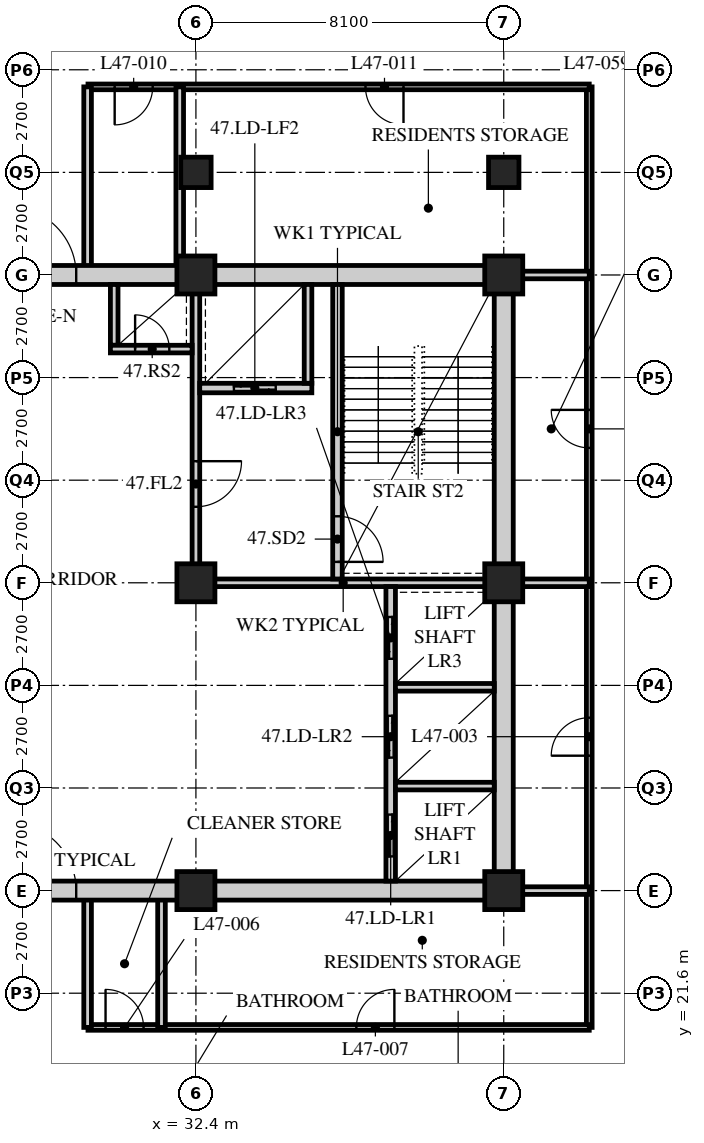
"""IFC4 building model, lengths in metres.
Left out: names, types, materials, properties, quantities, classifications, styles, units other than length and angle.
Written with IfcOpenShell. Run it as: python <this file> out.ifc"""

import sys

from ifc_helpers import new_model, si_unit, direction, frame, frame_2d, origin, origin_2d, place, context, subcontext, project, spatial, rectangle, hollow_rectangle, extrude, element, fill, save


model = new_model("IFC4")
c1 = context("Model", 3, precision=1e-05, world=origin(), true_north=direction((0.0, 1.0)))
c2 = subcontext(c1, "Body", "Model", "MODEL_VIEW")
j1 = project(units=[si_unit("LENGTHUNIT", "METRE"), si_unit("PLANEANGLEUNIT", "RADIAN")], contexts=[c1])
p1 = place(None, origin())
s1 = spatial("IfcSite", under=j1, at=p1, CompositionType="ELEMENT")
p2 = place(p1, origin())
s2 = spatial("IfcBuilding", under=s1, at=p2, CompositionType="ELEMENT")
p3 = place(p2, frame((0.0, 0.0, 184.8)))
s3 = spatial("IfcBuildingStorey", under=s2, at=p3, CompositionType="ELEMENT", Elevation=184.8)
for number, where, z_axis, x_axis in (
    (1, (32.4, 24.3, 0.0), (0.0, 0.0, 1.0), (1.0, 0.0, 0.0)),
    (2, (32.4, 32.4, 0.0), (0.0, 0.0, 1.0), (1.0, 0.0, 0.0)),
    (3, (32.4, 40.5, 0.0), (0.0, 0.0, 1.0), (1.0, 0.0, 0.0)),
):
    element("IfcColumn", number, at=place(p3, frame(where, z_axis=z_axis, x_axis=x_axis)), inside=s3, PredefinedType="COLUMN", context=c2, shape_type="SweptSolid", body=[
        extrude(hollow_rectangle(XDim=1.0, YDim=1.0, WallThickness=0.1, at=origin_2d()), origin(), (0.0, 0.0, 1.0), 3.6),
    ])
p4 = place(p3, frame((32.4, 43.2, 0.0), z_axis=(0.0, 0.0, 1.0), x_axis=(1.0, 0.0, 0.0)))
e4 = element("IfcColumn", 4, at=p4, inside=s3, PredefinedType="COLUMN", context=c2, shape_type="SweptSolid", body=[
    extrude(hollow_rectangle(XDim=0.8, YDim=0.8, WallThickness=0.08, at=origin_2d()), origin(), (0.0, 0.0, 1.0), 3.6),
])
for number, where, z_axis, x_axis in (
    (5, (40.5, 24.3, 0.0), (0.0, 0.0, 1.0), (1.0, 0.0, 0.0)),
    (6, (40.5, 32.4, 0.0), (0.0, 0.0, 1.0), (1.0, 0.0, 0.0)),
    (7, (40.5, 40.5, 0.0), (0.0, 0.0, 1.0), (1.0, 0.0, 0.0)),
):
    element("IfcColumn", number, at=place(p3, frame(where, z_axis=z_axis, x_axis=x_axis)), inside=s3, PredefinedType="COLUMN", context=c2, shape_type="SweptSolid", body=[
        extrude(hollow_rectangle(XDim=1.0, YDim=1.0, WallThickness=0.1, at=origin_2d()), origin(), (0.0, 0.0, 1.0), 3.6),
    ])
p5 = place(p3, frame((40.5, 43.2, 0.0), z_axis=(0.0, 0.0, 1.0), x_axis=(1.0, 0.0, 0.0)))
e8 = element("IfcColumn", 8, at=p5, inside=s3, PredefinedType="COLUMN", context=c2, shape_type="SweptSolid", body=[
    extrude(hollow_rectangle(XDim=0.8, YDim=0.8, WallThickness=0.08, at=origin_2d()), origin(), (0.0, 0.0, 1.0), 3.6),
])
p6 = place(p3, frame((42.75, 20.7, 0.0), z_axis=(0.0, 0.0, 1.0), x_axis=(0.0, 1.0, 0.0)))
e9 = element("IfcWall", 9, at=p6, inside=s3, PredefinedType="PARTITIONING", context=c2, shape_type="SweptSolid", body=[
    extrude(rectangle(XDim=24.75, YDim=0.15, at=frame_2d((12.375, 0.0))), origin(), (0.0, 0.0, 1.0), 3.39),
])
p7 = place(p6, frame((7.15, 0.0, 0.0)))
e10 = element("IfcOpeningElement", 10, at=p7, cuts=e9, PredefinedType="OPENING", context=c2, shape_type="SweptSolid", body=[
    extrude(rectangle(XDim=1.0, YDim=2.1, at=frame_2d((0.5, 1.05))), frame((0.0, 0.085, 0.0), z_axis=(0.0, -1.0, 0.0), x_axis=(1.0, 0.0, 0.0)), (0.0, 0.0, 1.0), 0.17),
])
p8 = place(p6, frame((15.25, 0.0, 0.0)))
e11 = element("IfcOpeningElement", 11, at=p8, cuts=e9, PredefinedType="OPENING", context=c2, shape_type="SweptSolid", body=[
    extrude(rectangle(XDim=1.0, YDim=2.1, at=frame_2d((0.5, 1.05))), frame((0.0, 0.085, 0.0), z_axis=(0.0, -1.0, 0.0), x_axis=(1.0, 0.0, 0.0)), (0.0, 0.0, 1.0), 0.17),
])
p9 = place(p3, frame((42.75, 45.45, 0.0), z_axis=(0.0, 0.0, 1.0), x_axis=(-1.0, 0.0, 0.0)))
e12 = element("IfcWall", 12, at=p9, inside=s3, PredefinedType="PARTITIONING", context=c2, shape_type="SweptSolid", body=[
    extrude(rectangle(XDim=13.19, YDim=0.15, at=frame_2d((6.595, 0.0))), origin(), (0.0, 0.0, 1.0), 3.39),
])
p10 = place(p9, frame((11.488, 0.0, 0.0)))
e13 = element("IfcOpeningElement", 13, at=p10, cuts=e12, PredefinedType="OPENING", context=c2, shape_type="SweptSolid", body=[
    extrude(rectangle(XDim=1.0, YDim=2.1, at=frame_2d((0.5, 1.05))), frame((0.0, 0.085, 0.0), z_axis=(0.0, -1.0, 0.0), x_axis=(1.0, 0.0, 0.0)), (0.0, 0.0, 1.0), 0.17),
])
p11 = place(p9, frame((4.888, 0.0, 0.0)))
e14 = element("IfcOpeningElement", 14, at=p11, cuts=e12, PredefinedType="OPENING", context=c2, shape_type="SweptSolid", body=[
    extrude(rectangle(XDim=1.0, YDim=2.1, at=frame_2d((0.5, 1.05))), frame((0.0, 0.085, 0.0), z_axis=(0.0, -1.0, 0.0), x_axis=(1.0, 0.0, 0.0)), (0.0, 0.0, 1.0), 0.17),
])
p12 = place(p3, frame((29.56, 20.7, 0.0), z_axis=(0.0, 0.0, 1.0), x_axis=(1.0, 0.0, 0.0)))
e15 = element("IfcWall", 15, at=p12, inside=s3, PredefinedType="PARTITIONING", context=c2, shape_type="SweptSolid", body=[
    extrude(rectangle(XDim=13.19, YDim=0.15, at=frame_2d((6.595, 0.0))), origin(), (0.0, 0.0, 1.0), 3.39),
])
p13 = place(p12, frame((0.462, 0.0, 0.0)))
e16 = element("IfcOpeningElement", 16, at=p13, cuts=e15, PredefinedType="OPENING", context=c2, shape_type="SweptSolid", body=[
    extrude(rectangle(XDim=1.0, YDim=2.1, at=frame_2d((0.5, 1.05))), frame((0.0, 0.085, 0.0), z_axis=(0.0, -1.0, 0.0), x_axis=(1.0, 0.0, 0.0)), (0.0, 0.0, 1.0), 0.17),
])
p14 = place(p12, frame((7.062, 0.0, 0.0)))
e17 = element("IfcOpeningElement", 17, at=p14, cuts=e15, PredefinedType="OPENING", context=c2, shape_type="SweptSolid", body=[
    extrude(rectangle(XDim=1.0, YDim=2.1, at=frame_2d((0.5, 1.05))), frame((0.0, 0.085, 0.0), z_axis=(0.0, -1.0, 0.0), x_axis=(1.0, 0.0, 0.0)), (0.0, 0.0, 1.0), 0.17),
])
p15 = place(p3, frame((40.5, 32.4, 0.0), z_axis=(0.0, 0.0, 1.0), x_axis=(1.0, 0.0, 0.0)))
e18 = element("IfcWall", 18, at=p15, inside=s3, PredefinedType="SOLIDWALL", context=c2, shape_type="SweptSolid", body=[
    extrude(rectangle(XDim=2.25, YDim=0.2, at=frame_2d((1.125, 0.0))), origin(), (0.0, 0.0, 1.0), 3.39),
])
for number, where, z_axis, x_axis in (
    (19, (31.494, 20.7, 0.0), (0.0, 0.0, 1.0), (0.0, 1.0, 0.0)),
    (20, (29.55, 20.7, 0.0), (0.0, 0.0, 1.0), (0.0, 1.0, 0.0)),
):
    element("IfcWall", number, at=place(p3, frame(where, z_axis=z_axis, x_axis=x_axis)), inside=s3, PredefinedType="SOLIDWALL", context=c2, shape_type="SweptSolid", body=[
        extrude(rectangle(XDim=3.6, YDim=0.2, at=frame_2d((1.8, 0.0))), origin(), (0.0, 0.0, 1.0), 3.39),
    ])
p16 = place(p3, frame((31.974, 45.45, 0.0), z_axis=(0.0, 0.0, 1.0), x_axis=(0.0, -1.0, 0.0)))
e21 = element("IfcWall", 21, at=p16, inside=s3, PredefinedType="SOLIDWALL", context=c2, shape_type="SweptSolid", body=[
    extrude(rectangle(XDim=4.95, YDim=0.2, at=frame_2d((2.475, 0.0))), origin(), (0.0, 0.0, 1.0), 2.69),
])
p17 = place(p3, frame((29.55, 40.5, 0.0), z_axis=(0.0, 0.0, 1.0), x_axis=(0.0, 1.0, 0.0)))
e22 = element("IfcWall", 22, at=p17, inside=s3, PredefinedType="SOLIDWALL", context=c2, shape_type="SweptSolid", body=[
    extrude(rectangle(XDim=4.95, YDim=0.2, at=frame_2d((2.475, 0.0))), origin(), (0.0, 0.0, 1.0), 3.39),
])
for number, where, z_axis, x_axis in (
    (23, (40.5, 24.3, 0.0), (0.0, 0.0, 1.0), (1.0, 0.0, 0.0)),
    (24, (40.5, 40.5, 0.0), (0.0, 0.0, 1.0), (1.0, 0.0, 0.0)),
):
    element("IfcWall", number, at=place(p3, frame(where, z_axis=z_axis, x_axis=x_axis)), inside=s3, PredefinedType="SOLIDWALL", context=c2, shape_type="SweptSolid", body=[
        extrude(rectangle(XDim=2.25, YDim=0.2, at=frame_2d((1.125, 0.0))), origin(), (0.0, 0.0, 1.0), 3.39),
    ])
p18 = place(p3, frame((15.95, 24.3, 0.0), z_axis=(0.0, 0.0, 1.0), x_axis=(1.0, 0.0, 0.0)))
e25 = element("IfcWall", 25, at=p18, inside=s3, PredefinedType="SOLIDWALL", context=c2, shape_type="SweptSolid", body=[
    extrude(rectangle(XDim=24.8, YDim=0.5, at=frame_2d((12.4, 0.0))), origin(), (0.0, 0.0, 1.0), 2.74),
])
p19 = place(p18, frame((11.5, 0.0, 0.0)))
e26 = element("IfcOpeningElement", 26, at=p19, cuts=e25, PredefinedType="OPENING", context=c2, shape_type="SweptSolid", body=[
    extrude(rectangle(XDim=1.8, YDim=2.4, at=frame_2d((0.9, 1.2))), frame((0.0, 0.26, 0.0), z_axis=(0.0, -1.0, 0.0), x_axis=(1.0, 0.0, 0.0)), (0.0, 0.0, 1.0), 0.52),
])
p20 = place(p3, frame((15.95, 40.5, 0.0), z_axis=(0.0, 0.0, 1.0), x_axis=(1.0, 0.0, 0.0)))
e27 = element("IfcWall", 27, at=p20, inside=s3, PredefinedType="SOLIDWALL", context=c2, shape_type="SweptSolid", body=[
    extrude(rectangle(XDim=24.8, YDim=0.5, at=frame_2d((12.4, 0.0))), origin(), (0.0, 0.0, 1.0), 2.74),
])
p21 = place(p20, frame((11.5, 0.0, 0.0)))
e28 = element("IfcOpeningElement", 28, at=p21, cuts=e27, PredefinedType="OPENING", context=c2, shape_type="SweptSolid", body=[
    extrude(rectangle(XDim=1.8, YDim=2.4, at=frame_2d((0.9, 1.2))), frame((0.0, 0.26, 0.0), z_axis=(0.0, -1.0, 0.0), x_axis=(1.0, 0.0, 0.0)), (0.0, 0.0, 1.0), 0.52),
])
p22 = place(p3, frame((40.5, 24.55, 0.0), z_axis=(0.0, 0.0, 1.0), x_axis=(0.0, 1.0, 0.0)))
e29 = element("IfcWall", 29, at=p22, inside=s3, PredefinedType="SOLIDWALL", context=c2, shape_type="SweptSolid", body=[
    extrude(rectangle(XDim=15.7, YDim=0.5, at=frame_2d((7.85, 0.0))), origin(), (0.0, 0.0, 1.0), 2.778),
])
p23 = place(p3, frame((32.3, 32.4, 0.0), z_axis=(0.0, 0.0, 1.0), x_axis=(1.0, 0.0, 0.0)))
e30 = element("IfcWall", 30, at=p23, inside=s3, PredefinedType="SOLIDWALL", context=c2, shape_type="SweptSolid", body=[
    extrude(rectangle(XDim=7.95, YDim=0.2, at=frame_2d((3.975, 0.0))), origin(), (0.0, 0.0, 1.0), 2.778),
])
p24 = place(p3, frame((32.4, 32.5, 0.0), z_axis=(0.0, 0.0, 1.0), x_axis=(0.0, 1.0, 0.0)))
e31 = element("IfcWall", 31, at=p24, inside=s3, PredefinedType="SOLIDWALL", context=c2, shape_type="SweptSolid", body=[
    extrude(rectangle(XDim=7.75, YDim=0.2, at=frame_2d((3.875, 0.0))), origin(), (0.0, 0.0, 1.0), 2.778),
])
p25 = place(p24, frame((1.9, 0.0, 0.0)))
e32 = element("IfcOpeningElement", 32, at=p25, cuts=e31, PredefinedType="OPENING", context=c2, shape_type="SweptSolid", body=[
    extrude(rectangle(XDim=1.2, YDim=2.1, at=frame_2d((0.6, 1.05))), frame((0.0, 0.11, 0.0), z_axis=(0.0, -1.0, 0.0), x_axis=(1.0, 0.0, 0.0)), (0.0, 0.0, 1.0), 0.22),
])
p26 = place(p3, frame((37.525, 24.55, 0.0), z_axis=(0.0, 0.0, 1.0), x_axis=(0.0, 1.0, 0.0)))
e33 = element("IfcWall", 33, at=p26, inside=s3, PredefinedType="SOLIDWALL", context=c2, shape_type="SweptSolid", body=[
    extrude(rectangle(XDim=7.75, YDim=0.25, at=frame_2d((3.875, 0.0))), origin(), (0.0, 0.0, 1.0), 3.39),
])
p27 = place(p26, frame((0.65, 0.0, 0.0)))
e34 = element("IfcOpeningElement", 34, at=p27, cuts=e33, PredefinedType="OPENING", context=c2, shape_type="SweptSolid", body=[
    extrude(rectangle(XDim=1.1, YDim=2.4, at=frame_2d((0.55, 1.2))), frame((0.0, 0.135, 0.0), z_axis=(0.0, -1.0, 0.0), x_axis=(1.0, 0.0, 0.0)), (0.0, 0.0, 1.0), 0.27),
])
p28 = place(p26, frame((3.25, 0.0, 0.0)))
e35 = element("IfcOpeningElement", 35, at=p28, cuts=e33, PredefinedType="OPENING", context=c2, shape_type="SweptSolid", body=[
    extrude(rectangle(XDim=1.1, YDim=2.4, at=frame_2d((0.55, 1.2))), frame((0.0, 0.135, 0.0), z_axis=(0.0, -1.0, 0.0), x_axis=(1.0, 0.0, 0.0)), (0.0, 0.0, 1.0), 0.27),
])
p29 = place(p26, frame((5.85, 0.0, 0.0)))
e36 = element("IfcOpeningElement", 36, at=p29, cuts=e33, PredefinedType="OPENING", context=c2, shape_type="SweptSolid", body=[
    extrude(rectangle(XDim=1.1, YDim=2.4, at=frame_2d((0.55, 1.2))), frame((0.0, 0.135, 0.0), z_axis=(0.0, -1.0, 0.0), x_axis=(1.0, 0.0, 0.0)), (0.0, 0.0, 1.0), 0.27),
])
for number, where, z_axis, x_axis in (
    (37, (37.65, 27.05, 0.0), (0.0, 0.0, 1.0), (1.0, 0.0, 0.0)),
    (38, (37.65, 29.65, 0.0), (0.0, 0.0, 1.0), (1.0, 0.0, 0.0)),
):
    element("IfcWall", number, at=place(p3, frame(where, z_axis=z_axis, x_axis=x_axis)), inside=s3, PredefinedType="SOLIDWALL", context=c2, shape_type="SweptSolid", body=[
        extrude(rectangle(XDim=2.6, YDim=0.2, at=frame_2d((1.3, 0.0))), origin(), (0.0, 0.0, 1.0), 3.39),
    ])
p30 = place(p3, frame((36.125, 32.5, 0.0), z_axis=(0.0, 0.0, 1.0), x_axis=(0.0, 1.0, 0.0)))
e39 = element("IfcWall", 39, at=p30, inside=s3, PredefinedType="SOLIDWALL", context=c2, shape_type="SweptSolid", body=[
    extrude(rectangle(XDim=7.75, YDim=0.25, at=frame_2d((3.875, 0.0))), origin(), (0.0, 0.0, 1.0), 3.39),
])
p31 = place(p30, frame((0.45, 0.0, 0.0)))
e40 = element("IfcOpeningElement", 40, at=p31, cuts=e39, PredefinedType="OPENING", context=c2, shape_type="SweptSolid", body=[
    extrude(rectangle(XDim=1.2, YDim=2.1, at=frame_2d((0.6, 1.05))), frame((0.0, 0.135, 0.0), z_axis=(0.0, -1.0, 0.0), x_axis=(1.0, 0.0, 0.0)), (0.0, 0.0, 1.0), 0.27),
])
p32 = place(p3, frame((32.5, 37.525, 0.0), z_axis=(0.0, 0.0, 1.0), x_axis=(1.0, 0.0, 0.0)))
e41 = element("IfcWall", 41, at=p32, inside=s3, PredefinedType="SOLIDWALL", context=c2, shape_type="SweptSolid", body=[
    extrude(rectangle(XDim=2.95, YDim=0.25, at=frame_2d((1.475, 0.0))), origin(), (0.0, 0.0, 1.0), 3.39),
])
p33 = place(p32, frame((0.9, 0.0, 0.0)))
e42 = element("IfcOpeningElement", 42, at=p33, cuts=e41, PredefinedType="OPENING", context=c2, shape_type="SweptSolid", body=[
    extrude(rectangle(XDim=1.1, YDim=2.4, at=frame_2d((0.55, 1.2))), frame((0.0, 0.135, 0.0), z_axis=(0.0, -1.0, 0.0), x_axis=(1.0, 0.0, 0.0)), (0.0, 0.0, 1.0), 0.27),
])
p34 = place(p3, frame((35.35, 37.65, 0.0), z_axis=(0.0, 0.0, 1.0), x_axis=(0.0, 1.0, 0.0)))
e43 = element("IfcWall", 43, at=p34, inside=s3, PredefinedType="SOLIDWALL", context=c2, shape_type="SweptSolid", body=[
    extrude(rectangle(XDim=2.6, YDim=0.2, at=frame_2d((1.3, 0.0))), origin(), (0.0, 0.0, 1.0), 3.39),
])
p35 = place(p3, frame((30.25, 38.65, 0.0), z_axis=(0.0, 0.0, 1.0), x_axis=(0.0, 1.0, 0.0)))
e44 = element("IfcWall", 44, at=p35, inside=s3, PredefinedType="SOLIDWALL", context=c2, shape_type="SweptSolid", body=[
    extrude(rectangle(XDim=1.6, YDim=0.2, at=frame_2d((0.8, 0.0))), origin(), (0.0, 0.0, 1.0), 3.39),
])
p36 = place(p3, frame((30.15, 38.55, 0.0), z_axis=(0.0, 0.0, 1.0), x_axis=(1.0, 0.0, 0.0)))
e45 = element("IfcWall", 45, at=p36, inside=s3, PredefinedType="SOLIDWALL", context=c2, shape_type="SweptSolid", body=[
    extrude(rectangle(XDim=2.15, YDim=0.2, at=frame_2d((1.075, 0.0))), origin(), (0.0, 0.0, 1.0), 3.39),
])
p37 = place(p36, frame((0.65, 0.0, 0.0)))
e46 = element("IfcOpeningElement", 46, at=p37, cuts=e45, PredefinedType="OPENING", context=c2, shape_type="SweptSolid", body=[
    extrude(rectangle(XDim=0.9, YDim=2.1, at=frame_2d((0.45, 1.05))), frame((0.0, 0.11, 0.0), z_axis=(0.0, -1.0, 0.0), x_axis=(1.0, 0.0, 0.0)), (0.0, 0.0, 1.0), 0.22),
])
p38 = place(p7, origin())
e47 = element("IfcDoor", 47, at=p38, inside=s3, OperationType="SINGLE_SWING_LEFT", PredefinedType="DOOR", context=c2, shape_type="SweptSolid", body=[
    extrude(rectangle(XDim=1.0, YDim=2.1, at=frame_2d((0.5, 1.05))), frame((0.0, 0.025, 0.0), z_axis=(0.0, -1.0, 0.0), x_axis=(1.0, 0.0, 0.0)), (0.0, 0.0, 1.0), 0.05),
])
fill(e10, e47)
p39 = place(p8, origin())
e48 = element("IfcDoor", 48, at=p39, inside=s3, OperationType="SINGLE_SWING_RIGHT", PredefinedType="DOOR", context=c2, shape_type="SweptSolid", body=[
    extrude(rectangle(XDim=1.0, YDim=2.1, at=frame_2d((0.5, 1.05))), frame((0.0, 0.025, 0.0), z_axis=(0.0, -1.0, 0.0), x_axis=(1.0, 0.0, 0.0)), (0.0, 0.0, 1.0), 0.05),
])
fill(e11, e48)
p40 = place(p13, origin())
e49 = element("IfcDoor", 49, at=p40, inside=s3, OperationType="SINGLE_SWING_LEFT", PredefinedType="DOOR", context=c2, shape_type="SweptSolid", body=[
    extrude(rectangle(XDim=1.0, YDim=2.1, at=frame_2d((0.5, 1.05))), frame((0.0, 0.025, 0.0), z_axis=(0.0, -1.0, 0.0), x_axis=(1.0, 0.0, 0.0)), (0.0, 0.0, 1.0), 0.05),
])
fill(e16, e49)
p41 = place(p14, origin())
e50 = element("IfcDoor", 50, at=p41, inside=s3, OperationType="SINGLE_SWING_RIGHT", PredefinedType="DOOR", context=c2, shape_type="SweptSolid", body=[
    extrude(rectangle(XDim=1.0, YDim=2.1, at=frame_2d((0.5, 1.05))), frame((0.0, 0.025, 0.0), z_axis=(0.0, -1.0, 0.0), x_axis=(1.0, 0.0, 0.0)), (0.0, 0.0, 1.0), 0.05),
])
fill(e17, e50)
p42 = place(p10, origin())
e51 = element("IfcDoor", 51, at=p42, inside=s3, OperationType="SINGLE_SWING_RIGHT", PredefinedType="DOOR", context=c2, shape_type="SweptSolid", body=[
    extrude(rectangle(XDim=1.0, YDim=2.1, at=frame_2d((0.5, 1.05))), frame((0.0, 0.025, 0.0), z_axis=(0.0, -1.0, 0.0), x_axis=(1.0, 0.0, 0.0)), (0.0, 0.0, 1.0), 0.05),
])
fill(e13, e51)
p43 = place(p11, origin())
e52 = element("IfcDoor", 52, at=p43, inside=s3, OperationType="SINGLE_SWING_LEFT", PredefinedType="DOOR", context=c2, shape_type="SweptSolid", body=[
    extrude(rectangle(XDim=1.0, YDim=2.1, at=frame_2d((0.5, 1.05))), frame((0.0, 0.025, 0.0), z_axis=(0.0, -1.0, 0.0), x_axis=(1.0, 0.0, 0.0)), (0.0, 0.0, 1.0), 0.05),
])
fill(e14, e52)
p44 = place(p31, origin())
e53 = element("IfcDoor", 53, at=p44, inside=s3, OperationType="SINGLE_SWING_RIGHT", PredefinedType="DOOR", context=c2, shape_type="SweptSolid", body=[
    extrude(rectangle(XDim=1.2, YDim=2.1, at=frame_2d((0.6, 1.05))), frame((0.0, 0.025, 0.0), z_axis=(0.0, -1.0, 0.0), x_axis=(1.0, 0.0, 0.0)), (0.0, 0.0, 1.0), 0.05),
])
fill(e40, e53)
p45 = place(p25, origin())
e54 = element("IfcDoor", 54, at=p45, inside=s3, OperationType="SINGLE_SWING_LEFT", PredefinedType="DOOR", context=c2, shape_type="SweptSolid", body=[
    extrude(rectangle(XDim=1.2, YDim=2.1, at=frame_2d((0.6, 1.05))), frame((0.0, 0.025, 0.0), z_axis=(0.0, -1.0, 0.0), x_axis=(1.0, 0.0, 0.0)), (0.0, 0.0, 1.0), 0.05),
])
fill(e32, e54)
p46 = place(p37, origin())
e55 = element("IfcDoor", 55, at=p46, inside=s3, OperationType="SINGLE_SWING_LEFT", PredefinedType="DOOR", context=c2, shape_type="SweptSolid", body=[
    extrude(rectangle(XDim=0.9, YDim=2.1, at=frame_2d((0.45, 1.05))), frame((0.0, 0.025, 0.0), z_axis=(0.0, -1.0, 0.0), x_axis=(1.0, 0.0, 0.0)), (0.0, 0.0, 1.0), 0.05),
])
fill(e46, e55)
p47 = place(p27, origin())
e56 = element("IfcDoor", 56, at=p47, inside=s3, OperationType="DOUBLE_DOOR_SLIDING", PredefinedType="DOOR", context=c2, shape_type="SweptSolid", body=[
    extrude(rectangle(XDim=1.1, YDim=2.4, at=frame_2d((0.55, 1.2))), frame((0.0, 0.025, 0.0), z_axis=(0.0, -1.0, 0.0), x_axis=(1.0, 0.0, 0.0)), (0.0, 0.0, 1.0), 0.05),
])
fill(e34, e56)
p48 = place(p28, origin())
e57 = element("IfcDoor", 57, at=p48, inside=s3, OperationType="DOUBLE_DOOR_SLIDING", PredefinedType="DOOR", context=c2, shape_type="SweptSolid", body=[
    extrude(rectangle(XDim=1.1, YDim=2.4, at=frame_2d((0.55, 1.2))), frame((0.0, 0.025, 0.0), z_axis=(0.0, -1.0, 0.0), x_axis=(1.0, 0.0, 0.0)), (0.0, 0.0, 1.0), 0.05),
])
fill(e35, e57)
p49 = place(p29, origin())
e58 = element("IfcDoor", 58, at=p49, inside=s3, OperationType="DOUBLE_DOOR_SLIDING", PredefinedType="DOOR", context=c2, shape_type="SweptSolid", body=[
    extrude(rectangle(XDim=1.1, YDim=2.4, at=frame_2d((0.55, 1.2))), frame((0.0, 0.025, 0.0), z_axis=(0.0, -1.0, 0.0), x_axis=(1.0, 0.0, 0.0)), (0.0, 0.0, 1.0), 0.05),
])
fill(e36, e58)
p50 = place(p33, origin())
e59 = element("IfcDoor", 59, at=p50, inside=s3, OperationType="DOUBLE_DOOR_SLIDING", PredefinedType="DOOR", context=c2, shape_type="SweptSolid", body=[
    extrude(rectangle(XDim=1.1, YDim=2.4, at=frame_2d((0.55, 1.2))), frame((0.0, 0.025, 0.0), z_axis=(0.0, -1.0, 0.0), x_axis=(1.0, 0.0, 0.0)), (0.0, 0.0, 1.0), 0.05),
])
fill(e42, e59)
p51 = place(p19, origin())
e60 = element("IfcDoor", 60, at=p51, inside=s3, OperationType="DOUBLE_DOOR_SINGLE_SWING", PredefinedType="DOOR", context=c2, shape_type="SweptSolid", body=[
    extrude(rectangle(XDim=1.8, YDim=2.4, at=frame_2d((0.9, 1.2))), frame((0.0, 0.025, 0.0), z_axis=(0.0, -1.0, 0.0), x_axis=(1.0, 0.0, 0.0)), (0.0, 0.0, 1.0), 0.05),
])
fill(e26, e60)
p52 = place(p21, origin())
e61 = element("IfcDoor", 61, at=p52, inside=s3, OperationType="DOUBLE_DOOR_SINGLE_SWING", PredefinedType="DOOR", context=c2, shape_type="SweptSolid", body=[
    extrude(rectangle(XDim=1.8, YDim=2.4, at=frame_2d((0.9, 1.2))), frame((0.0, 0.025, 0.0), z_axis=(0.0, -1.0, 0.0), x_axis=(1.0, 0.0, 0.0)), (0.0, 0.0, 1.0), 0.05),
])
fill(e28, e61)
save(model, sys.argv[1])
